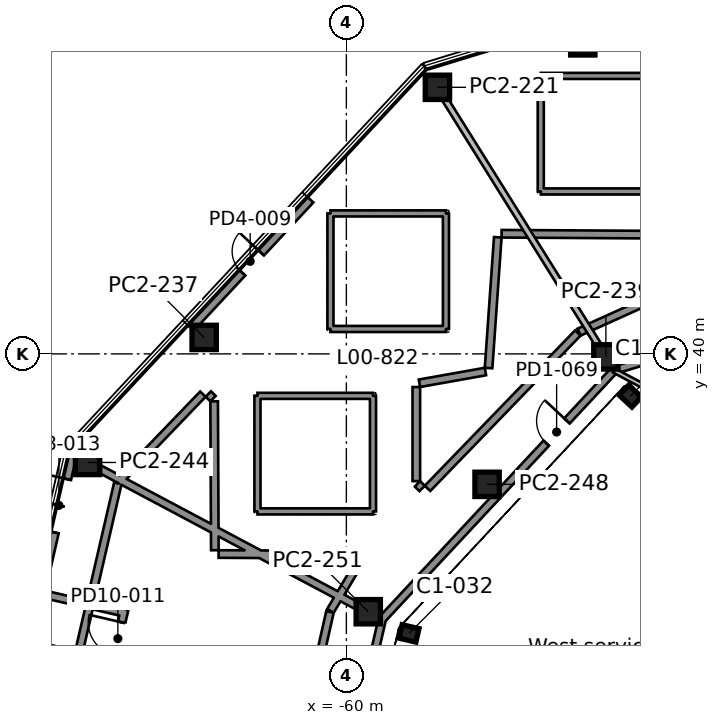
"""IFC4 building model, lengths in metres.
Left out: names, types, materials, properties, quantities, classifications, styles, units other than length and angle.
Written with IfcOpenShell. Run it as: python <this file> out.ifc"""

import sys

from ifc_helpers import new_model, si_unit, direction, frame, frame_2d, origin, origin_2d, place, context, subcontext, project, spatial, rectangle, i_section, extrude, element, fill, save


model = new_model("IFC4")
c1 = context("Model", 3, precision=1e-05, world=origin(), true_north=direction((0.0, 1.0)))
c2 = subcontext(c1, "Body", "Model", "MODEL_VIEW")
j1 = project(units=[si_unit("LENGTHUNIT", "METRE"), si_unit("PLANEANGLEUNIT", "RADIAN")], contexts=[c1])
p1 = place(None, origin())
s1 = spatial("IfcSite", under=j1, at=p1, CompositionType="ELEMENT")
p2 = place(p1, origin())
s2 = spatial("IfcBuilding", under=s1, at=p2, CompositionType="ELEMENT")
p3 = place(p2, origin())
s3 = spatial("IfcBuildingStorey", under=s2, at=p3, CompositionType="ELEMENT", Elevation=0.0)
for number, where, z_axis, x_axis in (
    (1, (-57.939, 30.807, 0.0), (0.0, 0.0, 1.0), (-0.225, -0.974, 0.0)),
    (2, (-50.66, 38.613, 0.0), (0.0, 0.0, 1.0), (-0.682, -0.731, 0.0)),
):
    element("IfcColumn", number, at=place(p3, frame(where, z_axis=z_axis, x_axis=x_axis)), inside=s3, PredefinedType="COLUMN", context=c2, shape_type="SweptSolid", body=[
        extrude(i_section(OverallWidth=0.455, OverallDepth=0.569, WebThickness=0.078, FlangeThickness=0.125, FilletRadius=0.015, at=origin_2d()), origin(), (0.0, 0.0, 1.0), 7.0),
    ])
for number, where, z_axis, x_axis in (
    (3, (-59.28, 31.52, 0.0), (0.0, 0.0, 1.0), (1.0, 0.0, 0.0)),
    (4, (-55.372, 35.71, 0.0), (0.0, 0.0, 1.0), (1.0, 0.0, 0.0)),
    (5, (-68.512, 36.429, 0.0), (0.0, 0.0, 1.0), (1.0, 0.0, 0.0)),
    (6, (-51.464, 39.901, 0.0), (0.0, 0.0, 1.0), (1.0, 0.0, 0.0)),
    (7, (-64.677, 40.542, 0.0), (0.0, 0.0, 1.0), (1.0, 0.0, 0.0)),
    (8, (-57.005, 48.768, 0.0), (0.0, 0.0, 1.0), (1.0, 0.0, 0.0)),
    (9, (-52.224, 50.23, 0.0), (0.0, 0.0, 1.0), (1.0, 0.0, 0.0)),
):
    element("IfcColumn", number, at=place(p3, frame(where, z_axis=z_axis, x_axis=x_axis)), inside=s3, PredefinedType="COLUMN", context=c2, shape_type="SweptSolid", body=[
        extrude(rectangle(XDim=0.8, YDim=0.8, at=origin_2d()), origin(), (0.0, 0.0, 1.0), 6.37),
    ])
p4 = place(p3, frame((-61.231, 45.117, 0.0), z_axis=(0.0, 0.0, 1.0), x_axis=(-0.681974287306, -0.731376149087, 0.0)))
e10 = element("IfcWall", 10, at=p4, inside=s3, PredefinedType="SOLIDWALL", context=c2, shape_type="SweptSolid", body=[
    extrude(rectangle(XDim=5.767, YDim=0.4, at=frame_2d((2.884, 0.0))), origin(), (0.0, 0.0, 1.0), 6.37),
])
p5 = place(p4, frame((2.384, 0.0, 0.0)))
e11 = element("IfcOpeningElement", 11, at=p5, cuts=e10, PredefinedType="OPENING", context=c2, shape_type="SweptSolid", body=[
    extrude(rectangle(XDim=0.9, YDim=2.1, at=frame_2d((0.45, 1.05))), frame((0.0, 0.21, 0.0), z_axis=(0.0, -1.0, 0.0), x_axis=(1.0, 0.0, 0.0)), (0.0, 0.0, 1.0), 0.42),
])
p6 = place(p3, frame((-69.034, 36.837, 0.0), z_axis=(0.0, 0.0, 1.0), x_axis=(-0.224951161352, -0.974370040081, 0.0)))
e12 = element("IfcWall", 12, at=p6, inside=s3, PredefinedType="SOLIDWALL", context=c2, shape_type="SweptSolid", body=[
    extrude(rectangle(XDim=17.314, YDim=0.4, at=frame_2d((8.657, 0.0))), origin(), (0.0, 0.0, 1.0), 6.37),
])
p7 = place(p6, frame((0.966, 0.0, 0.0)))
e13 = element("IfcOpeningElement", 13, at=p7, cuts=e12, PredefinedType="OPENING", context=c2, shape_type="SweptSolid", body=[
    extrude(rectangle(XDim=1.8, YDim=2.1, at=frame_2d((0.9, 1.05))), frame((0.0, 0.21, 0.0), z_axis=(0.0, -1.0, 0.0), x_axis=(1.0, 0.0, 0.0)), (0.0, 0.0, 1.0), 0.42),
])
p8 = place(p6, frame((13.984, 0.0, 0.0)))
e14 = element("IfcOpeningElement", 14, at=p8, cuts=e12, PredefinedType="OPENING", context=c2, shape_type="SweptSolid", body=[
    extrude(rectangle(XDim=0.9, YDim=2.1, at=frame_2d((0.45, 1.05))), frame((0.0, 0.21, 0.0), z_axis=(0.0, -1.0, 0.0), x_axis=(1.0, 0.0, 0.0)), (0.0, 0.0, 1.0), 0.42),
])
p9 = place(p3, frame((-71.112, 20.166, 7.0), z_axis=(0.0, 0.0, 1.0), x_axis=(0.22494984807, 0.974370343275, 0.0)))
e15 = element("IfcWall", 15, at=p9, inside=s3, PredefinedType="STANDARD", context=c2, shape_type="SweptSolid", body=[
    extrude(rectangle(XDim=15.987, YDim=0.25, at=frame_2d((7.993, 0.0))), origin(), (0.0, 0.0, 1.0), 0.65),
])
p10 = place(p3, frame((-67.484, 35.801, 7.0), z_axis=(0.0, 0.0, 1.0), x_axis=(0.693207741867, 0.720737834872, 0.0)))
e16 = element("IfcWall", 16, at=p10, inside=s3, PredefinedType="STANDARD", context=c2, shape_type="SweptSolid", body=[
    extrude(rectangle(XDim=3.991, YDim=0.25, at=frame_2d((1.995, 0.0))), origin(), (0.0, 0.0, 1.0), 0.65),
])
p11 = place(p3, frame((-64.54, 38.68, 7.0), z_axis=(0.0, 0.0, 1.0), x_axis=(0.714427882445, -0.699709082966, 0.0)))
e17 = element("IfcWall", 17, at=p11, inside=s3, PredefinedType="STANDARD", context=c2, shape_type="SweptSolid", body=[
    extrude(rectangle(XDim=0.216, YDim=0.25, at=frame_2d((0.108, 0.0))), origin(), (0.0, 0.0, 1.0), 0.65),
])
p12 = place(p3, frame((-64.348, 38.44, 7.0), z_axis=(0.0, 0.0, 1.0), x_axis=(0.004635810811, -0.999989254571, 0.0)))
e18 = element("IfcWall", 18, at=p12, inside=s3, PredefinedType="STANDARD", context=c2, shape_type="SweptSolid", body=[
    extrude(rectangle(XDim=4.898, YDim=0.25, at=frame_2d((2.449, 0.0))), origin(), (0.0, 0.0, 1.0), 0.65),
])
p13 = place(p3, frame((-64.201, 33.418, 7.0), z_axis=(0.0, 0.0, 1.0), x_axis=(0.99998580333, -0.005328521155, 0.0)))
e19 = element("IfcWall", 19, at=p13, inside=s3, PredefinedType="STANDARD", context=c2, shape_type="SweptSolid", body=[
    extrude(rectangle(XDim=4.261, YDim=0.25, at=frame_2d((2.13, 0.0))), origin(), (0.0, 0.0, 1.0), 0.65),
])
p14 = place(p3, frame((-59.854, 33.36, 7.0), z_axis=(0.0, 0.0, 1.0), x_axis=(0.715006669013, -0.699117631924, 0.0)))
e20 = element("IfcWall", 20, at=p14, inside=s3, PredefinedType="STANDARD", context=c2, shape_type="SweptSolid", body=[
    extrude(rectangle(XDim=0.261, YDim=0.25, at=frame_2d((0.131, 0.0))), origin(), (0.0, 0.0, 1.0), 0.65),
])
p15 = place(p3, frame((-59.647, 33.024, 7.0), z_axis=(0.0, 0.0, 1.0), x_axis=(-0.511061192034, -0.859544331606, 0.0)))
e21 = element("IfcWall", 21, at=p15, inside=s3, PredefinedType="STANDARD", context=c2, shape_type="SweptSolid", body=[
    extrude(rectangle(XDim=1.716, YDim=0.25, at=frame_2d((0.858, 0.0))), origin(), (0.0, 0.0, 1.0), 0.65),
])
p16 = place(p3, frame((-60.539, 31.513, 7.0), z_axis=(0.0, 0.0, 1.0), x_axis=(-0.220607009729, -0.975362777257, 0.0)))
e22 = element("IfcWall", 22, at=p16, inside=s3, PredefinedType="STANDARD", context=c2, shape_type="SweptSolid", body=[
    extrude(rectangle(XDim=11.344, YDim=0.25, at=frame_2d((5.672, 0.0))), origin(), (0.0, 0.0, 1.0), 0.65),
])
p17 = place(p3, frame((-55.323, 39.534, 7.0), z_axis=(0.0, 0.0, 1.0), x_axis=(0.070321561657, 0.997524374623, 0.0)))
e23 = element("IfcWall", 23, at=p17, inside=s3, PredefinedType="STANDARD", context=c2, shape_type="SweptSolid", body=[
    extrude(rectangle(XDim=4.312, YDim=0.25, at=frame_2d((2.156, 0.0))), origin(), (0.0, 0.0, 1.0), 0.65),
])
p18 = place(p3, frame((-54.894, 43.952, 7.0), z_axis=(0.0, 0.0, 1.0), x_axis=(0.999981548345, -0.006074781371, 0.0)))
e24 = element("IfcWall", 24, at=p18, inside=s3, PredefinedType="STANDARD", context=c2, shape_type="SweptSolid", body=[
    extrude(rectangle(XDim=5.385, YDim=0.25, at=frame_2d((2.693, 0.0))), origin(), (0.0, 0.0, 1.0), 0.65),
])
p19 = place(p3, frame((-49.14, 42.161, 7.0), z_axis=(0.0, 0.0, 1.0), x_axis=(-0.911744798019, -0.410757134187, 0.0)))
e25 = element("IfcWall", 25, at=p19, inside=s3, PredefinedType="STANDARD", context=c2, shape_type="SweptSolid", body=[
    extrude(rectangle(XDim=3.518, YDim=0.25, at=frame_2d((1.759, 0.0))), origin(), (0.0, 0.0, 1.0), 0.65),
])
p20 = place(p3, frame((-52.386, 40.689, 7.0), z_axis=(0.0, 0.0, 1.0), x_axis=(-0.695198363839, -0.718817942817, 0.0)))
e26 = element("IfcWall", 26, at=p20, inside=s3, PredefinedType="STANDARD", context=c2, shape_type="SweptSolid", body=[
    extrude(rectangle(XDim=7.111, YDim=0.25, at=frame_2d((3.556, 0.0))), origin(), (0.0, 0.0, 1.0), 0.65),
])
p21 = place(p3, frame((-57.507, 35.575, 7.0), z_axis=(0.0, 0.0, 1.0), x_axis=(-0.715547256149, 0.698564330766, 0.0)))
e27 = element("IfcWall", 27, at=p21, inside=s3, PredefinedType="STANDARD", context=c2, shape_type="SweptSolid", body=[
    extrude(rectangle(XDim=0.216, YDim=0.25, at=frame_2d((0.108, 0.0))), origin(), (0.0, 0.0, 1.0), 0.65),
])
p22 = place(p3, frame((-57.699, 35.815, 7.0), z_axis=(0.0, 0.0, 1.0), x_axis=(0.0, 1.0, 0.0)))
e28 = element("IfcWall", 28, at=p22, inside=s3, PredefinedType="STANDARD", context=c2, shape_type="SweptSolid", body=[
    extrude(rectangle(XDim=3.096, YDim=0.25, at=frame_2d((1.548, 0.0))), origin(), (0.0, 0.0, 1.0), 0.65),
])
p23 = place(p3, frame((-57.596, 39.034, 7.0), z_axis=(0.0, 0.0, 1.0), x_axis=(0.984517100609, 0.175288558122, 0.0)))
e29 = element("IfcWall", 29, at=p23, inside=s3, PredefinedType="STANDARD", context=c2, shape_type="SweptSolid", body=[
    extrude(rectangle(XDim=2.205, YDim=0.25, at=frame_2d((1.103, 0.0))), origin(), (0.0, 0.0, 1.0), 0.65),
])
for number, where, z_axis, x_axis in (
    (30, (-49.806, 45.343, 6.92), (0.0, 0.0, 1.0), (-1.0, 0.0, 0.0)),
    (31, (-53.606, 45.343, 6.92), (0.0, 0.0, 1.0), (0.0, 1.0, 0.0)),
    (32, (-53.606, 49.143, 6.92), (0.0, 0.0, 1.0), (1.0, 0.0, 0.0)),
    (33, (-59.124, 34.82, 6.92), (0.0, 0.0, 1.0), (-1.0, 0.0, 0.0)),
    (34, (-62.924, 34.82, 6.92), (0.0, 0.0, 1.0), (0.0, 1.0, 0.0)),
    (35, (-62.924, 38.62, 6.92), (0.0, 0.0, 1.0), (1.0, 0.0, 0.0)),
    (36, (-59.124, 38.62, 6.92), (0.0, 0.0, 1.0), (0.0, -1.0, 0.0)),
):
    element("IfcWall", number, at=place(p3, frame(where, z_axis=z_axis, x_axis=x_axis)), inside=s3, PredefinedType="SOLIDWALL", context=c2, shape_type="SweptSolid", body=[
        extrude(rectangle(XDim=3.8, YDim=0.2, at=frame_2d((1.9, 0.0))), origin(), (0.0, 0.0, 1.0), 0.18),
    ])
p24 = place(p3, frame((-56.724, 40.82, 6.92), z_axis=(0.0, 0.0, 1.0), x_axis=(-1.0, 0.0, 0.0)))
e37 = element("IfcWall", 37, at=p24, inside=s3, PredefinedType="SOLIDWALL", context=c2, shape_type="SweptSolid", body=[
    extrude(rectangle(XDim=3.8, YDim=0.2, at=frame_2d((1.9, 0.0))), origin(), (0.0, 0.0, 1.0), 0.18),
])
p25 = place(p3, frame((-60.524, 40.82, 6.92), z_axis=(0.0, 0.0, 1.0), x_axis=(0.0, 1.0, 0.0)))
e38 = element("IfcWall", 38, at=p25, inside=s3, PredefinedType="SOLIDWALL", context=c2, shape_type="SweptSolid", body=[
    extrude(rectangle(XDim=3.8, YDim=0.2, at=frame_2d((1.9, 0.0))), origin(), (0.0, 0.0, 1.0), 0.18),
])
p26 = place(p3, frame((-60.524, 44.62, 6.92), z_axis=(0.0, 0.0, 1.0), x_axis=(1.0, 0.0, 0.0)))
e39 = element("IfcWall", 39, at=p26, inside=s3, PredefinedType="SOLIDWALL", context=c2, shape_type="SweptSolid", body=[
    extrude(rectangle(XDim=3.8, YDim=0.2, at=frame_2d((1.9, 0.0))), origin(), (0.0, 0.0, 1.0), 0.18),
])
p27 = place(p3, frame((-56.724, 44.62, 6.92), z_axis=(0.0, 0.0, 1.0), x_axis=(0.0, -1.0, 0.0)))
e40 = element("IfcWall", 40, at=p27, inside=s3, PredefinedType="SOLIDWALL", context=c2, shape_type="SweptSolid", body=[
    extrude(rectangle(XDim=3.8, YDim=0.2, at=frame_2d((1.9, 0.0))), origin(), (0.0, 0.0, 1.0), 0.18),
])
p28 = place(p3, frame((-56.755, 48.368, 0.0), z_axis=(0.0, 0.0, 1.0), x_axis=(0.529920498626, -0.848047324821, 0.0)))
e41 = element("IfcWall", 41, at=p28, inside=s3, PredefinedType="PARTITIONING", context=c2, shape_type="SweptSolid", body=[
    extrude(rectangle(XDim=9.512, YDim=0.2, at=frame_2d((4.756, 0.0))), origin(), (0.0, 0.0, 1.0), 6.37),
])
p29 = place(p3, frame((-51.193, 39.459, 0.0), z_axis=(0.0, 0.0, 1.0), x_axis=(0.95625380249, 0.292538314113, 0.0)))
e42 = element("IfcWall", 42, at=p29, inside=s3, PredefinedType="SOLIDWALL", context=c2, shape_type="SweptSolid", body=[
    extrude(rectangle(XDim=11.133, YDim=0.25, at=frame_2d((5.566, 0.0))), origin(), (0.0, 0.0, 1.0), 6.37),
])
p30 = place(p29, frame((4.05, 0.0, 0.0)))
e43 = element("IfcOpeningElement", 43, at=p30, cuts=e42, PredefinedType="OPENING", context=c2, shape_type="SweptSolid", body=[
    extrude(rectangle(XDim=1.0, YDim=2.1, at=frame_2d((0.5, 1.05))), frame((0.0, 0.135, 0.0), z_axis=(0.0, -1.0, 0.0), x_axis=(1.0, 0.0, 0.0)), (0.0, 0.0, 1.0), 0.27),
])
p31 = place(p3, frame((-68.112, 36.216, 0.0), z_axis=(0.0, 0.0, 1.0), x_axis=(0.882949504028, -0.469467968382, 0.0)))
e44 = element("IfcWall", 44, at=p31, inside=s3, PredefinedType="SOLIDWALL", context=c2, shape_type="SweptSolid", body=[
    extrude(rectangle(XDim=9.55, YDim=0.25, at=frame_2d((4.775, 0.0))), origin(), (0.0, 0.0, 1.0), 6.37),
])
p32 = place(p3, frame((-58.824, 31.273, 0.0), z_axis=(0.0, 0.0, 1.0), x_axis=(0.681856343792, 0.73148610816, 0.0)))
e45 = element("IfcWall", 45, at=p32, inside=s3, PredefinedType="SOLIDWALL", context=c2, shape_type="SweptSolid", body=[
    extrude(rectangle(XDim=5.519, YDim=0.25, at=frame_2d((2.76, 0.0))), origin(), (0.0, 0.0, 1.0), 6.37),
])
p33 = place(p3, frame((-54.972, 35.405, 0.0), z_axis=(0.0, 0.0, 1.0), x_axis=(0.681862401645, 0.731480461273, 0.0)))
e46 = element("IfcWall", 46, at=p33, inside=s3, PredefinedType="SOLIDWALL", context=c2, shape_type="SweptSolid", body=[
    extrude(rectangle(XDim=5.535, YDim=0.25, at=frame_2d((2.768, 0.0))), origin(), (0.0, 0.0, 1.0), 6.37),
])
p34 = place(p33, frame((2.268, 0.0, 0.0)))
e47 = element("IfcOpeningElement", 47, at=p34, cuts=e46, PredefinedType="OPENING", context=c2, shape_type="SweptSolid", body=[
    extrude(rectangle(XDim=1.0, YDim=2.1, at=frame_2d((0.5, 1.05))), frame((0.0, 0.135, 0.0), z_axis=(0.0, -1.0, 0.0), x_axis=(1.0, 0.0, 0.0)), (0.0, 0.0, 1.0), 0.27),
])
p35 = place(p3, frame((-60.731, 23.01, 0.0), z_axis=(0.0, 0.0, 1.0), x_axis=(0.225176723851, 0.974317937347, 0.0)))
e48 = element("IfcWall", 48, at=p35, inside=s3, PredefinedType="SOLIDWALL", context=c2, shape_type="SweptSolid", body=[
    extrude(rectangle(XDim=8.487, YDim=0.25, at=frame_2d((4.244, 0.0))), origin(), (0.0, 0.0, 1.0), 6.37),
])
p36 = place(p35, frame((3.594, 0.0, 0.0)))
e49 = element("IfcOpeningElement", 49, at=p36, cuts=e48, PredefinedType="OPENING", context=c2, shape_type="SweptSolid", body=[
    extrude(rectangle(XDim=1.8, YDim=2.1, at=frame_2d((0.9, 1.05))), frame((0.0, 0.135, 0.0), z_axis=(0.0, -1.0, 0.0), x_axis=(1.0, 0.0, 0.0)), (0.0, 0.0, 1.0), 0.27),
])
p37 = place(p3, frame((-50.26, 38.956, 0.0), z_axis=(0.0, 0.0, 1.0), x_axis=(-0.882925119508, 0.469513826572, 0.0)))
e50 = element("IfcWall", 50, at=p37, inside=s3, PredefinedType="PARTITIONING", context=c2, shape_type="SweptSolid", body=[
    extrude(rectangle(XDim=1.062, YDim=0.15, at=frame_2d((0.531, 0.0))), origin(), (0.0, 0.0, 1.0), 6.55),
])
p38 = place(p3, frame((-69.925, 32.09, 0.0), z_axis=(0.0, 0.0, 1.0), x_axis=(0.974369148124, -0.224955024802, 0.0)))
e51 = element("IfcWall", 51, at=p38, inside=s3, PredefinedType="SOLIDWALL", context=c2, shape_type="SweptSolid", body=[
    extrude(rectangle(XDim=2.8, YDim=0.25, at=frame_2d((1.4, 0.0))), origin(), (0.0, 0.0, 1.0), 6.37),
])
p39 = place(p3, frame((-67.29, 31.61, 0.0), z_axis=(0.0, 0.0, 1.0), x_axis=(-0.224940552999, -0.974372489152, 0.0)))
e52 = element("IfcWall", 52, at=p39, inside=s3, PredefinedType="SOLIDWALL", context=c2, shape_type="SweptSolid", body=[
    extrude(rectangle(XDim=6.6, YDim=0.25, at=frame_2d((3.3, 0.0))), origin(), (0.0, 0.0, 1.0), 6.37),
])
p40 = place(p39, frame((0.45, 0.0, 0.0)))
e53 = element("IfcOpeningElement", 53, at=p40, cuts=e52, PredefinedType="OPENING", context=c2, shape_type="SweptSolid", body=[
    extrude(rectangle(XDim=1.1, YDim=2.1, at=frame_2d((0.55, 1.05))), frame((0.0, 0.135, 0.0), z_axis=(0.0, -1.0, 0.0), x_axis=(1.0, 0.0, 0.0)), (0.0, 0.0, 1.0), 0.27),
])
p41 = place(p5, frame((0.9, 0.0, 0.0), z_axis=(0.0, 0.0, 1.0), x_axis=(-1.0, 0.0, 0.0)))
e54 = element("IfcDoor", 54, at=p41, inside=s3, OperationType="SINGLE_SWING_RIGHT", PredefinedType="DOOR", context=c2, shape_type="SweptSolid", body=[
    extrude(rectangle(XDim=0.9, YDim=2.1, at=frame_2d((0.45, 1.05))), frame((0.0, 0.025, 0.0), z_axis=(0.0, -1.0, 0.0), x_axis=(1.0, 0.0, 0.0)), (0.0, 0.0, 1.0), 0.05),
])
fill(e11, e54)
p42 = place(p7, frame((1.8, 0.0, 0.0), z_axis=(0.0, 0.0, 1.0), x_axis=(-1.0, 0.0, 0.0)))
e55 = element("IfcDoor", 55, at=p42, inside=s3, OperationType="DOUBLE_DOOR_SINGLE_SWING", PredefinedType="DOOR", context=c2, shape_type="SweptSolid", body=[
    extrude(rectangle(XDim=1.8, YDim=2.1, at=frame_2d((0.9, 1.05))), frame((0.0, 0.025, 0.0), z_axis=(0.0, -1.0, 0.0), x_axis=(1.0, 0.0, 0.0)), (0.0, 0.0, 1.0), 0.05),
])
fill(e13, e55)
p43 = place(p3, frame((0.0, 0.0, 6.37)))
p44 = place(p43, frame((-51.706, 47.243, 0.0)))
p45 = place(p44, frame((0.0, 0.0, 0.5)))
e56 = element("IfcWindow", 56, at=p45, inside=s3, PartitioningType="SINGLE_PANEL", PredefinedType="SKYLIGHT", context=c2, shape_type="SweptSolid", body=[
    extrude(rectangle(XDim=3.6, YDim=3.6, at=origin_2d()), origin(), (0.0, 0.0, 1.0), 0.05),
])
p46 = place(p43, frame((-61.024, 36.72, 0.0)))
p47 = place(p46, frame((0.0, 0.0, 0.5)))
e57 = element("IfcWindow", 57, at=p47, inside=s3, PartitioningType="SINGLE_PANEL", PredefinedType="SKYLIGHT", context=c2, shape_type="SweptSolid", body=[
    extrude(rectangle(XDim=3.6, YDim=3.6, at=origin_2d()), origin(), (0.0, 0.0, 1.0), 0.05),
])
p48 = place(p43, frame((-58.624, 42.72, 0.0)))
p49 = place(p48, frame((0.0, 0.0, 0.5)))
e58 = element("IfcWindow", 58, at=p49, inside=s3, PartitioningType="SINGLE_PANEL", PredefinedType="SKYLIGHT", context=c2, shape_type="SweptSolid", body=[
    extrude(rectangle(XDim=3.6, YDim=3.6, at=origin_2d()), origin(), (0.0, 0.0, 1.0), 0.05),
])
p50 = place(p40, frame((1.1, 0.0, 0.0), z_axis=(0.0, 0.0, 1.0), x_axis=(-1.0, 0.0, 0.0)))
e59 = element("IfcDoor", 59, at=p50, inside=s3, OperationType="SINGLE_SWING_RIGHT", PredefinedType="DOOR", context=c2, shape_type="SweptSolid", body=[
    extrude(rectangle(XDim=1.1, YDim=2.1, at=frame_2d((0.55, 1.05))), frame((0.0, 0.025, 0.0), z_axis=(0.0, -1.0, 0.0), x_axis=(1.0, 0.0, 0.0)), (0.0, 0.0, 1.0), 0.05),
])
fill(e53, e59)
p51 = place(p34, origin())
e60 = element("IfcDoor", 60, at=p51, inside=s3, OperationType="SINGLE_SWING_RIGHT", PredefinedType="DOOR", context=c2, shape_type="SweptSolid", body=[
    extrude(rectangle(XDim=1.0, YDim=2.1, at=frame_2d((0.5, 1.05))), frame((0.0, 0.025, 0.0), z_axis=(0.0, -1.0, 0.0), x_axis=(1.0, 0.0, 0.0)), (0.0, 0.0, 1.0), 0.05),
])
fill(e47, e60)
save(model, sys.argv[1])
